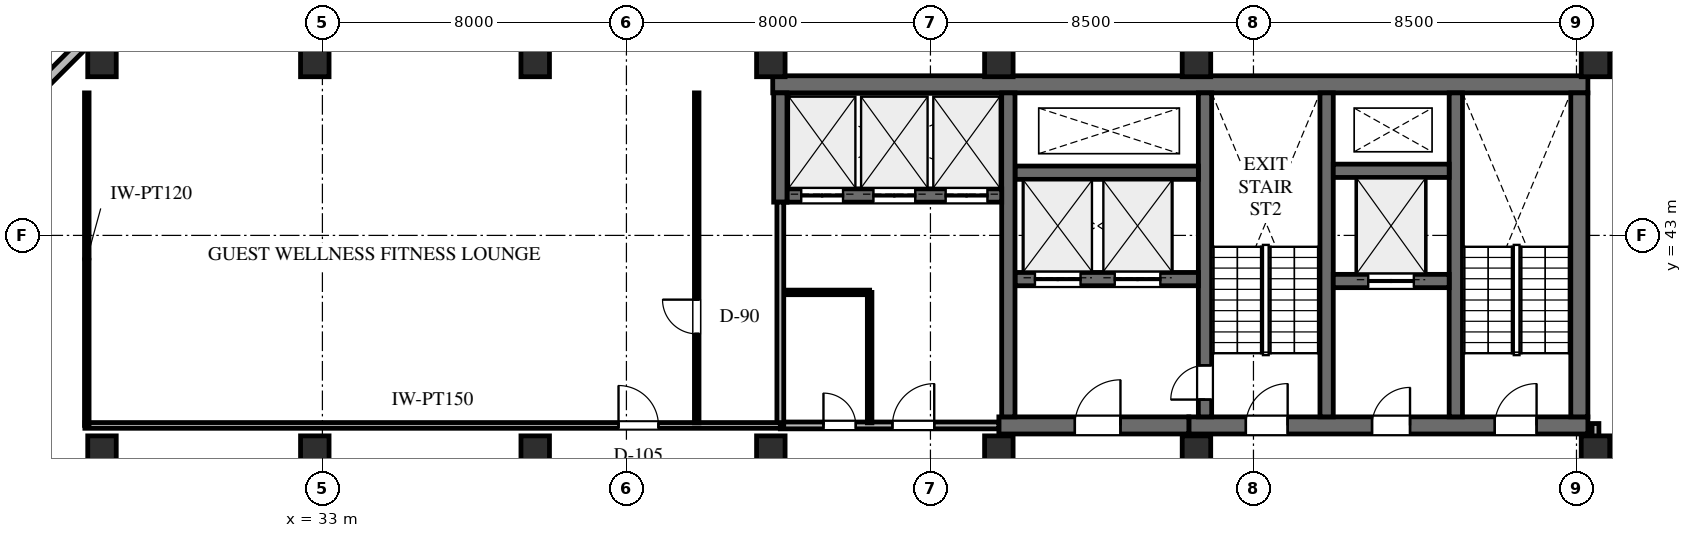
"""IFC4 building model, lengths in metres.
Left out: names, types, materials, properties, quantities, classifications, styles, units other than length and angle.
Written with IfcOpenShell. Run it as: python <this file> out.ifc"""

import sys

from ifc_helpers import new_model, si_unit, direction, frame, frame_2d, origin, origin_2d, place, context, subcontext, project, spatial, rectangle, extrude, element, fill, save


model = new_model("IFC4")
c1 = context("Model", 3, precision=1e-05, world=origin(), true_north=direction((0.0, 1.0)))
c2 = subcontext(c1, "Body", "Model", "MODEL_VIEW")
j1 = project(units=[si_unit("LENGTHUNIT", "METRE"), si_unit("PLANEANGLEUNIT", "RADIAN")], contexts=[c1])
p1 = place(None, origin())
s1 = spatial("IfcSite", under=j1, at=p1, CompositionType="ELEMENT")
p2 = place(p1, origin())
s2 = spatial("IfcBuilding", under=s1, at=p2, CompositionType="ELEMENT")
p3 = place(p2, frame((0.0, 0.0, 249.0)))
s3 = spatial("IfcBuildingStorey", under=s2, at=p3, CompositionType="ELEMENT", Elevation=249.0)
p4 = place(p3, frame((44.85, 46.975, 0.0), z_axis=(0.0, 0.0, 1.0), x_axis=(1.0, 0.0, 0.0)))
e1 = element("IfcWall", 1, at=p4, inside=s3, PredefinedType="SHEAR", context=c2, shape_type="SweptSolid", body=[
    extrude(rectangle(XDim=21.45, YDim=0.45, at=frame_2d((10.725, 0.0))), origin(), (0.0, 0.0, 1.0), 3.6),
])
p5 = place(p3, frame((55.8, 38.0, 0.0), z_axis=(0.0, 0.0, 1.0), x_axis=(1.0, 0.0, 0.0)))
e2 = element("IfcWall", 2, at=p5, inside=s3, PredefinedType="SHEAR", context=c2, shape_type="SweptSolid", body=[
    extrude(rectangle(XDim=10.5, YDim=0.45, at=frame_2d((5.25, 0.0))), origin(), (0.0, 0.0, 1.0), 3.6),
])
p6 = place(p5, frame((1.5, 0.0, 0.0)))
e3 = element("IfcOpeningElement", 3, at=p6, cuts=e2, PredefinedType="OPENING", context=c2, shape_type="SweptSolid", body=[
    extrude(rectangle(XDim=1.1, YDim=2.2, at=frame_2d((0.55, 1.1))), frame((0.0, 0.235, 0.0), z_axis=(0.0, -1.0, 0.0), x_axis=(1.0, 0.0, 0.0)), (0.0, 0.0, 1.0), 0.47),
])
p7 = place(p5, frame((4.82, 0.0, 0.0)))
e4 = element("IfcOpeningElement", 4, at=p7, cuts=e2, PredefinedType="OPENING", context=c2, shape_type="SweptSolid", body=[
    extrude(rectangle(XDim=1.0, YDim=2.15, at=frame_2d((0.5, 1.075))), frame((0.0, 0.235, 0.0), z_axis=(0.0, -1.0, 0.0), x_axis=(1.0, 0.0, 0.0)), (0.0, 0.0, 1.0), 0.47),
])
p8 = place(p5, frame((8.05, 0.0, 0.0)))
e5 = element("IfcOpeningElement", 5, at=p8, cuts=e2, PredefinedType="OPENING", context=c2, shape_type="SweptSolid", body=[
    extrude(rectangle(XDim=1.1, YDim=2.2, at=frame_2d((0.55, 1.1))), frame((0.0, 0.235, 0.0), z_axis=(0.0, -1.0, 0.0), x_axis=(1.0, 0.0, 0.0)), (0.0, 0.0, 1.0), 0.47),
])
p9 = place(p3, frame((66.075, 38.225, 0.0), z_axis=(0.0, 0.0, 1.0), x_axis=(0.0, 1.0, 0.0)))
e6 = element("IfcWall", 6, at=p9, inside=s3, PredefinedType="SHEAR", context=c2, shape_type="SweptSolid", body=[
    extrude(rectangle(XDim=8.525, YDim=0.45, at=frame_2d((4.262, 0.0))), origin(), (0.0, 0.0, 1.0), 3.6),
])
for number, where, z_axis, x_axis in (
    (7, (62.825, 38.225, 0.0), (0.0, 0.0, 1.0), (0.0, 1.0, 0.0)),
    (8, (59.425, 38.225, 0.0), (0.0, 0.0, 1.0), (0.0, 1.0, 0.0)),
):
    element("IfcWall", number, at=place(p3, frame(where, z_axis=z_axis, x_axis=x_axis)), inside=s3, PredefinedType="SHEAR", context=c2, shape_type="SweptSolid", body=[
        extrude(rectangle(XDim=8.525, YDim=0.35, at=frame_2d((4.262, 0.0))), origin(), (0.0, 0.0, 1.0), 3.6),
    ])
p10 = place(p3, frame((56.225, 38.225, 0.0), z_axis=(0.0, 0.0, 1.0), x_axis=(0.0, 1.0, 0.0)))
e9 = element("IfcWall", 9, at=p10, inside=s3, PredefinedType="SHEAR", context=c2, shape_type="SweptSolid", body=[
    extrude(rectangle(XDim=8.525, YDim=0.35, at=frame_2d((4.262, 0.0))), origin(), (0.0, 0.0, 1.0), 3.6),
])
p11 = place(p10, frame((0.455, 0.0, 0.0)))
e10 = element("IfcOpeningElement", 10, at=p11, cuts=e9, PredefinedType="OPENING", context=c2, shape_type="SweptSolid", body=[
    extrude(rectangle(XDim=0.9, YDim=2.15, at=frame_2d((0.45, 1.075))), frame((0.0, 0.185, 0.0), z_axis=(0.0, -1.0, 0.0), x_axis=(1.0, 0.0, 0.0)), (0.0, 0.0, 1.0), 0.37),
])
p12 = place(p3, frame((59.6, 41.8, 0.0), z_axis=(0.0, 0.0, 1.0), x_axis=(1.0, 0.0, 0.0)))
e11 = element("IfcWall", 11, at=p12, inside=s3, PredefinedType="SHEAR", context=c2, shape_type="SweptSolid", body=[
    extrude(rectangle(XDim=3.05, YDim=0.35, at=frame_2d((1.525, 0.0))), origin(), (0.0, 0.0, 1.0), 3.6),
])
p13 = place(p12, frame((0.92, 0.0, 0.0)))
e12 = element("IfcOpeningElement", 12, at=p13, cuts=e11, PredefinedType="OPENING", context=c2, shape_type="SweptSolid", body=[
    extrude(rectangle(XDim=1.2, YDim=2.2, at=frame_2d((0.6, 1.1))), frame((0.0, 0.185, 0.0), z_axis=(0.0, -1.0, 0.0), x_axis=(1.0, 0.0, 0.0)), (0.0, 0.0, 1.0), 0.37),
])
p14 = place(p3, frame((59.6, 44.7, 0.0), z_axis=(0.0, 0.0, 1.0), x_axis=(1.0, 0.0, 0.0)))
e13 = element("IfcWall", 13, at=p14, inside=s3, PredefinedType="SHEAR", context=c2, shape_type="SweptSolid", body=[
    extrude(rectangle(XDim=3.05, YDim=0.35, at=frame_2d((1.525, 0.0))), origin(), (0.0, 0.0, 1.0), 3.6),
])
p15 = place(p3, frame((50.8, 38.0, 0.0), z_axis=(0.0, 0.0, 1.0), x_axis=(1.0, 0.0, 0.0)))
e14 = element("IfcWall", 14, at=p15, inside=s3, PredefinedType="SHEAR", context=c2, shape_type="SweptSolid", body=[
    extrude(rectangle(XDim=5.0, YDim=0.45, at=frame_2d((2.5, 0.0))), origin(), (0.0, 0.0, 1.0), 3.6),
])
p16 = place(p15, frame((2.0, 0.0, 0.0)))
e15 = element("IfcOpeningElement", 15, at=p16, cuts=e14, PredefinedType="OPENING", context=c2, shape_type="SweptSolid", body=[
    extrude(rectangle(XDim=1.2, YDim=2.2, at=frame_2d((0.6, 1.1))), frame((0.0, 0.235, 0.0), z_axis=(0.0, -1.0, 0.0), x_axis=(1.0, 0.0, 0.0)), (0.0, 0.0, 1.0), 0.47),
])
p17 = place(p3, frame((51.225, 41.85, 0.0), z_axis=(0.0, 0.0, 1.0), x_axis=(1.0, 0.0, 0.0)))
e16 = element("IfcWall", 16, at=p17, inside=s3, PredefinedType="SHEAR", context=c2, shape_type="SweptSolid", body=[
    extrude(rectangle(XDim=4.825, YDim=0.35, at=frame_2d((2.413, 0.0))), origin(), (0.0, 0.0, 1.0), 3.6),
])
p18 = place(p17, frame((0.525, 0.0, 0.0)))
e17 = element("IfcOpeningElement", 17, at=p18, cuts=e16, PredefinedType="OPENING", context=c2, shape_type="SweptSolid", body=[
    extrude(rectangle(XDim=1.2, YDim=2.2, at=frame_2d((0.6, 1.1))), frame((0.0, 0.185, 0.0), z_axis=(0.0, -1.0, 0.0), x_axis=(1.0, 0.0, 0.0)), (0.0, 0.0, 1.0), 0.37),
])
p19 = place(p17, frame((2.625, 0.0, 0.0)))
e18 = element("IfcOpeningElement", 18, at=p19, cuts=e16, PredefinedType="OPENING", context=c2, shape_type="SweptSolid", body=[
    extrude(rectangle(XDim=1.2, YDim=2.2, at=frame_2d((0.6, 1.1))), frame((0.0, 0.185, 0.0), z_axis=(0.0, -1.0, 0.0), x_axis=(1.0, 0.0, 0.0)), (0.0, 0.0, 1.0), 0.37),
])
p20 = place(p3, frame((51.225, 44.65, 0.0), z_axis=(0.0, 0.0, 1.0), x_axis=(1.0, 0.0, 0.0)))
e19 = element("IfcWall", 19, at=p20, inside=s3, PredefinedType="SHEAR", context=c2, shape_type="SweptSolid", body=[
    extrude(rectangle(XDim=4.825, YDim=0.35, at=frame_2d((2.413, 0.0))), origin(), (0.0, 0.0, 1.0), 3.6),
])
p21 = place(p3, frame((51.05, 38.225, 0.0), z_axis=(0.0, 0.0, 1.0), x_axis=(0.0, 1.0, 0.0)))
e20 = element("IfcWall", 20, at=p21, inside=s3, PredefinedType="SHEAR", context=c2, shape_type="SweptSolid", body=[
    extrude(rectangle(XDim=8.525, YDim=0.35, at=frame_2d((4.262, 0.0))), origin(), (0.0, 0.0, 1.0), 3.6),
])
p22 = place(p3, frame((45.225, 44.05, 0.0), z_axis=(0.0, 0.0, 1.0), x_axis=(1.0, 0.0, 0.0)))
e21 = element("IfcWall", 21, at=p22, inside=s3, PredefinedType="SHEAR", context=c2, shape_type="SweptSolid", body=[
    extrude(rectangle(XDim=5.65, YDim=0.35, at=frame_2d((2.825, 0.0))), origin(), (0.0, 0.0, 1.0), 3.6),
])
p23 = place(p22, frame((0.375, 0.0, 0.0)))
e22 = element("IfcOpeningElement", 22, at=p23, cuts=e21, PredefinedType="OPENING", context=c2, shape_type="SweptSolid", body=[
    extrude(rectangle(XDim=1.1, YDim=2.2, at=frame_2d((0.55, 1.1))), frame((0.0, 0.185, 0.0), z_axis=(0.0, -1.0, 0.0), x_axis=(1.0, 0.0, 0.0)), (0.0, 0.0, 1.0), 0.37),
])
p24 = place(p22, frame((2.275, 0.0, 0.0)))
e23 = element("IfcOpeningElement", 23, at=p24, cuts=e21, PredefinedType="OPENING", context=c2, shape_type="SweptSolid", body=[
    extrude(rectangle(XDim=1.1, YDim=2.2, at=frame_2d((0.55, 1.1))), frame((0.0, 0.185, 0.0), z_axis=(0.0, -1.0, 0.0), x_axis=(1.0, 0.0, 0.0)), (0.0, 0.0, 1.0), 0.37),
])
p25 = place(p22, frame((4.175, 0.0, 0.0)))
e24 = element("IfcOpeningElement", 24, at=p25, cuts=e21, PredefinedType="OPENING", context=c2, shape_type="SweptSolid", body=[
    extrude(rectangle(XDim=1.1, YDim=2.2, at=frame_2d((0.55, 1.1))), frame((0.0, 0.185, 0.0), z_axis=(0.0, -1.0, 0.0), x_axis=(1.0, 0.0, 0.0)), (0.0, 0.0, 1.0), 0.37),
])
p26 = place(p3, frame((45.05, 43.875, 0.0), z_axis=(0.0, 0.0, 1.0), x_axis=(0.0, 1.0, 0.0)))
e25 = element("IfcWall", 25, at=p26, inside=s3, PredefinedType="SHEAR", context=c2, shape_type="SweptSolid", body=[
    extrude(rectangle(XDim=2.875, YDim=0.35, at=frame_2d((1.438, 0.0))), origin(), (0.0, 0.0, 1.0), 3.6),
])
for number, where, z_axis, x_axis in (
    (26, (66.5, 47.55, 0.0), (0.0, 0.0, 1.0), (1.0, 0.0, 0.0)),
    (27, (56.0, 47.55, 0.0), (0.0, 0.0, 1.0), (1.0, 0.0, 0.0)),
    (28, (66.5, 37.35, 0.0), (0.0, 0.0, 1.0), (1.0, 0.0, 0.0)),
    (29, (56.0, 37.35, 0.0), (0.0, 0.0, 1.0), (1.0, 0.0, 0.0)),
    (30, (50.8, 47.55, 0.0), (0.0, 0.0, 1.0), (1.0, 0.0, 0.0)),
    (31, (50.8, 37.35, 0.0), (0.0, 0.0, 1.0), (1.0, 0.0, 0.0)),
    (32, (44.8, 37.35, 0.0), (0.0, 0.0, 1.0), (1.0, 0.0, 0.0)),
    (33, (44.8, 47.55, 0.0), (0.0, 0.0, 1.0), (1.0, 0.0, 0.0)),
    (34, (38.6, 37.35, 0.0), (0.0, 0.0, 1.0), (1.0, 0.0, 0.0)),
    (35, (38.6, 47.55, 0.0), (0.0, 0.0, 1.0), (1.0, 0.0, 0.0)),
    (36, (32.8, 37.35, 0.0), (0.0, 0.0, 1.0), (1.0, 0.0, 0.0)),
    (37, (32.8, 47.55, 0.0), (0.0, 0.0, 1.0), (1.0, 0.0, 0.0)),
    (38, (27.2, 37.35, 0.0), (0.0, 0.0, 1.0), (1.0, 0.0, 0.0)),
    (39, (27.2, 47.55, 0.0), (0.0, 0.0, 1.0), (1.0, 0.0, 0.0)),
):
    element("IfcColumn", number, at=place(p3, frame(where, z_axis=z_axis, x_axis=x_axis)), inside=s3, PredefinedType="COLUMN", context=c2, shape_type="SweptSolid", body=[
        extrude(rectangle(XDim=0.75, YDim=0.75, at=origin_2d()), origin(), (0.0, 0.0, 1.0), 3.6),
    ])
p27 = place(p3, frame((25.12, 46.45, 0.0), z_axis=(0.0, 0.0, 1.0), x_axis=(0.707106781187, 0.707106781187, 0.0)))
e40 = element("IfcWall", 40, at=p27, inside=s3, PredefinedType="STANDARD", context=c2, shape_type="SweptSolid", body=[
    extrude(rectangle(XDim=2.729, YDim=0.28, at=frame_2d((1.365, 0.0))), origin(), (0.0, 0.0, 1.0), 3.36),
])
p28 = place(p3, frame((68.375, 37.8, 0.0), z_axis=(0.0, 0.0, 1.0), x_axis=(-0.13917438523, -0.990267888248, 0.0)))
e41 = element("IfcWall", 41, at=p28, inside=s3, PredefinedType="STANDARD", context=c2, shape_type="SweptSolid", body=[
    extrude(rectangle(XDim=18.135, YDim=0.28, at=frame_2d((9.067, 0.0))), origin(), (0.0, 0.0, 1.0), 3.36),
])
p29 = place(p28, frame((8.279, 0.0, 0.0)))
e42 = element("IfcOpeningElement", 42, at=p29, cuts=e41, PredefinedType="OPENING", context=c2, shape_type="SweptSolid", body=[
    extrude(rectangle(XDim=1.0, YDim=2.15, at=frame_2d((0.5, 1.075))), frame((0.0, 0.15, 0.0), z_axis=(0.0, -1.0, 0.0), x_axis=(1.0, 0.0, 0.0)), (0.0, 0.0, 1.0), 0.3),
])
p30 = place(p28, frame((3.997, 0.0, 0.65)))
e43 = element("IfcOpeningElement", 43, at=p30, cuts=e41, PredefinedType="OPENING", context=c2, shape_type="SweptSolid", body=[
    extrude(rectangle(XDim=1.8, YDim=2.1, at=frame_2d((0.9, 1.05))), frame((0.0, 0.15, 0.0), z_axis=(0.0, -1.0, 0.0), x_axis=(1.0, 0.0, 0.0)), (0.0, 0.0, 1.0), 0.3),
])
p31 = place(p28, frame((12.338, 0.0, 0.65)))
e44 = element("IfcOpeningElement", 44, at=p31, cuts=e41, PredefinedType="OPENING", context=c2, shape_type="SweptSolid", body=[
    extrude(rectangle(XDim=1.8, YDim=2.1, at=frame_2d((0.9, 1.05))), frame((0.0, 0.15, 0.0), z_axis=(0.0, -1.0, 0.0), x_axis=(1.0, 0.0, 0.0)), (0.0, 0.0, 1.0), 0.3),
])
p32 = place(p3, frame((45.05, 38.0, 0.0), z_axis=(0.0, 0.0, 1.0), x_axis=(1.0, 0.0, 0.0)))
e45 = element("IfcWall", 45, at=p32, inside=s3, PredefinedType="STANDARD", context=c2, shape_type="SweptSolid", body=[
    extrude(rectangle(XDim=5.75, YDim=0.18, at=frame_2d((2.875, 0.0))), origin(), (0.0, 0.0, 1.0), 2.664),
])
p33 = place(p32, frame((1.135, 0.0, 0.0)))
e46 = element("IfcOpeningElement", 46, at=p33, cuts=e45, PredefinedType="OPENING", context=c2, shape_type="SweptSolid", body=[
    extrude(rectangle(XDim=0.85, YDim=2.1, at=frame_2d((0.425, 1.05))), frame((0.0, 0.1, 0.0), z_axis=(0.0, -1.0, 0.0), x_axis=(1.0, 0.0, 0.0)), (0.0, 0.0, 1.0), 0.2),
])
p34 = place(p32, frame((2.95, 0.0, 0.0)))
e47 = element("IfcOpeningElement", 47, at=p34, cuts=e45, PredefinedType="OPENING", context=c2, shape_type="SweptSolid", body=[
    extrude(rectangle(XDim=1.1, YDim=2.2, at=frame_2d((0.55, 1.1))), frame((0.0, 0.1, 0.0), z_axis=(0.0, -1.0, 0.0), x_axis=(1.0, 0.0, 0.0)), (0.0, 0.0, 1.0), 0.2),
])
p35 = place(p3, frame((47.4, 38.068, 0.0), z_axis=(0.0, 0.0, 1.0), x_axis=(0.0, 1.0, 0.0)))
e48 = element("IfcWall", 48, at=p35, inside=s3, PredefinedType="PARTITIONING", context=c2, shape_type="SweptSolid", body=[
    extrude(rectangle(XDim=3.432, YDim=0.12, at=frame_2d((1.716, 0.0))), origin(), (0.0, 0.0, 1.0), 3.36),
])
p36 = place(p3, frame((45.118, 41.5, 0.0), z_axis=(0.0, 0.0, 1.0), x_axis=(1.0, 0.0, 0.0)))
e49 = element("IfcWall", 49, at=p36, inside=s3, PredefinedType="PARTITIONING", context=c2, shape_type="SweptSolid", body=[
    extrude(rectangle(XDim=2.282, YDim=0.12, at=frame_2d((1.141, 0.0))), origin(), (0.0, 0.0, 1.0), 3.36),
])
p37 = place(p3, frame((45.05, 38.0, 0.0), z_axis=(0.0, 0.0, 1.0), x_axis=(0.0, 1.0, 0.0)))
e50 = element("IfcWall", 50, at=p37, inside=s3, PredefinedType="STANDARD", context=c2, shape_type="SweptSolid", body=[
    extrude(rectangle(XDim=5.875, YDim=0.18, at=frame_2d((2.938, 0.0))), origin(), (0.0, 0.0, 1.0), 2.664),
])
p38 = place(p3, frame((26.75, 38.0, 0.0), z_axis=(0.0, 0.0, 1.0), x_axis=(1.0, 0.0, 0.0)))
e51 = element("IfcWall", 51, at=p38, inside=s3, PredefinedType="PARTITIONING", context=c2, shape_type="SweptSolid", body=[
    extrude(rectangle(XDim=18.3, YDim=0.15, at=frame_2d((9.15, 0.0))), origin(), (0.0, 0.0, 1.0), 2.664),
])
p39 = place(p38, frame((14.042, 0.0, 0.0)))
e52 = element("IfcOpeningElement", 52, at=p39, cuts=e51, PredefinedType="OPENING", context=c2, shape_type="SweptSolid", body=[
    extrude(rectangle(XDim=1.05, YDim=2.2, at=frame_2d((0.525, 1.1))), frame((0.0, 0.085, 0.0), z_axis=(0.0, -1.0, 0.0), x_axis=(1.0, 0.0, 0.0)), (0.0, 0.0, 1.0), 0.17),
])
p40 = place(p3, frame((26.8, 38.0, 0.0), z_axis=(0.0, 0.0, 1.0), x_axis=(0.0, 1.0, 0.0)))
e53 = element("IfcWall", 53, at=p40, inside=s3, PredefinedType="PARTITIONING", context=c2, shape_type="SweptSolid", body=[
    extrude(rectangle(XDim=8.75, YDim=0.12, at=frame_2d((4.375, 0.0))), origin(), (0.0, 0.0, 1.0), 3.36),
])
p41 = place(p3, frame((42.85, 38.068, 0.0), z_axis=(0.0, 0.0, 1.0), x_axis=(0.0, 1.0, 0.0)))
e54 = element("IfcWall", 54, at=p41, inside=s3, PredefinedType="PARTITIONING", context=c2, shape_type="SweptSolid", body=[
    extrude(rectangle(XDim=8.682, YDim=0.12, at=frame_2d((4.341, 0.0))), origin(), (0.0, 0.0, 1.0), 3.36),
])
p42 = place(p41, frame((2.342, 0.0, 0.0)))
e55 = element("IfcOpeningElement", 55, at=p42, cuts=e54, PredefinedType="OPENING", context=c2, shape_type="SweptSolid", body=[
    extrude(rectangle(XDim=0.9, YDim=2.1, at=frame_2d((0.45, 1.05))), frame((0.0, 0.07, 0.0), z_axis=(0.0, -1.0, 0.0), x_axis=(1.0, 0.0, 0.0)), (0.0, 0.0, 1.0), 0.14),
])
p43 = place(p3, frame((66.5, 34.468, 0.0), z_axis=(0.0, 0.0, 1.0), x_axis=(0.0, 1.0, 0.0)))
e56 = element("IfcWall", 56, at=p43, inside=s3, PredefinedType="STANDARD", context=c2, shape_type="SweptSolid", body=[
    extrude(rectangle(XDim=3.582, YDim=0.18, at=frame_2d((1.791, 0.0))), origin(), (0.0, 0.0, 1.0), 2.664),
])
p44 = place(p6, origin())
e57 = element("IfcDoor", 57, at=p44, inside=s3, OperationType="SINGLE_SWING_RIGHT", PredefinedType="DOOR", context=c2, shape_type="SweptSolid", body=[
    extrude(rectangle(XDim=1.1, YDim=2.2, at=frame_2d((0.55, 1.1))), frame((0.0, 0.025, 0.0), z_axis=(0.0, -1.0, 0.0), x_axis=(1.0, 0.0, 0.0)), (0.0, 0.0, 1.0), 0.05),
])
fill(e3, e57)
p45 = place(p7, origin())
e58 = element("IfcDoor", 58, at=p45, inside=s3, OperationType="SINGLE_SWING_RIGHT", PredefinedType="DOOR", context=c2, shape_type="SweptSolid", body=[
    extrude(rectangle(XDim=1.0, YDim=2.15, at=frame_2d((0.5, 1.075))), frame((0.0, 0.025, 0.0), z_axis=(0.0, -1.0, 0.0), x_axis=(1.0, 0.0, 0.0)), (0.0, 0.0, 1.0), 0.05),
])
fill(e4, e58)
p46 = place(p8, origin())
e59 = element("IfcDoor", 59, at=p46, inside=s3, OperationType="SINGLE_SWING_RIGHT", PredefinedType="DOOR", context=c2, shape_type="SweptSolid", body=[
    extrude(rectangle(XDim=1.1, YDim=2.2, at=frame_2d((0.55, 1.1))), frame((0.0, 0.025, 0.0), z_axis=(0.0, -1.0, 0.0), x_axis=(1.0, 0.0, 0.0)), (0.0, 0.0, 1.0), 0.05),
])
fill(e5, e59)
p47 = place(p16, origin())
e60 = element("IfcDoor", 60, at=p47, inside=s3, OperationType="SINGLE_SWING_RIGHT", PredefinedType="DOOR", context=c2, shape_type="SweptSolid", body=[
    extrude(rectangle(XDim=1.2, YDim=2.2, at=frame_2d((0.6, 1.1))), frame((0.0, 0.025, 0.0), z_axis=(0.0, -1.0, 0.0), x_axis=(1.0, 0.0, 0.0)), (0.0, 0.0, 1.0), 0.05),
])
fill(e15, e60)
p48 = place(p11, origin())
e61 = element("IfcDoor", 61, at=p48, inside=s3, OperationType="SINGLE_SWING_LEFT", PredefinedType="DOOR", context=c2, shape_type="SweptSolid", body=[
    extrude(rectangle(XDim=0.9, YDim=2.15, at=frame_2d((0.45, 1.075))), frame((0.0, 0.025, 0.0), z_axis=(0.0, -1.0, 0.0), x_axis=(1.0, 0.0, 0.0)), (0.0, 0.0, 1.0), 0.05),
])
fill(e10, e61)
p49 = place(p23, origin())
e62 = element("IfcDoor", 62, at=p49, inside=s3, OperationType="DOUBLE_DOOR_SLIDING", PredefinedType="DOOR", context=c2, shape_type="SweptSolid", body=[
    extrude(rectangle(XDim=1.1, YDim=2.2, at=frame_2d((0.55, 1.1))), frame((0.0, 0.025, 0.0), z_axis=(0.0, -1.0, 0.0), x_axis=(1.0, 0.0, 0.0)), (0.0, 0.0, 1.0), 0.05),
])
fill(e22, e62)
p50 = place(p24, origin())
e63 = element("IfcDoor", 63, at=p50, inside=s3, OperationType="DOUBLE_DOOR_SLIDING", PredefinedType="DOOR", context=c2, shape_type="SweptSolid", body=[
    extrude(rectangle(XDim=1.1, YDim=2.2, at=frame_2d((0.55, 1.1))), frame((0.0, 0.025, 0.0), z_axis=(0.0, -1.0, 0.0), x_axis=(1.0, 0.0, 0.0)), (0.0, 0.0, 1.0), 0.05),
])
fill(e23, e63)
p51 = place(p25, origin())
e64 = element("IfcDoor", 64, at=p51, inside=s3, OperationType="DOUBLE_DOOR_SLIDING", PredefinedType="DOOR", context=c2, shape_type="SweptSolid", body=[
    extrude(rectangle(XDim=1.1, YDim=2.2, at=frame_2d((0.55, 1.1))), frame((0.0, 0.025, 0.0), z_axis=(0.0, -1.0, 0.0), x_axis=(1.0, 0.0, 0.0)), (0.0, 0.0, 1.0), 0.05),
])
fill(e24, e64)
p52 = place(p18, origin())
e65 = element("IfcDoor", 65, at=p52, inside=s3, OperationType="DOUBLE_DOOR_SLIDING", PredefinedType="DOOR", context=c2, shape_type="SweptSolid", body=[
    extrude(rectangle(XDim=1.2, YDim=2.2, at=frame_2d((0.6, 1.1))), frame((0.0, 0.025, 0.0), z_axis=(0.0, -1.0, 0.0), x_axis=(1.0, 0.0, 0.0)), (0.0, 0.0, 1.0), 0.05),
])
fill(e17, e65)
p53 = place(p19, origin())
e66 = element("IfcDoor", 66, at=p53, inside=s3, OperationType="DOUBLE_DOOR_SLIDING", PredefinedType="DOOR", context=c2, shape_type="SweptSolid", body=[
    extrude(rectangle(XDim=1.2, YDim=2.2, at=frame_2d((0.6, 1.1))), frame((0.0, 0.025, 0.0), z_axis=(0.0, -1.0, 0.0), x_axis=(1.0, 0.0, 0.0)), (0.0, 0.0, 1.0), 0.05),
])
fill(e18, e66)
p54 = place(p13, origin())
e67 = element("IfcDoor", 67, at=p54, inside=s3, OperationType="DOUBLE_DOOR_SLIDING", PredefinedType="DOOR", context=c2, shape_type="SweptSolid", body=[
    extrude(rectangle(XDim=1.2, YDim=2.2, at=frame_2d((0.6, 1.1))), frame((0.0, 0.025, 0.0), z_axis=(0.0, -1.0, 0.0), x_axis=(1.0, 0.0, 0.0)), (0.0, 0.0, 1.0), 0.05),
])
fill(e12, e67)
p55 = place(p33, origin())
e68 = element("IfcDoor", 68, at=p55, inside=s3, OperationType="SINGLE_SWING_LEFT", PredefinedType="DOOR", context=c2, shape_type="SweptSolid", body=[
    extrude(rectangle(XDim=0.85, YDim=2.1, at=frame_2d((0.425, 1.05))), frame((0.0, 0.025, 0.0), z_axis=(0.0, -1.0, 0.0), x_axis=(1.0, 0.0, 0.0)), (0.0, 0.0, 1.0), 0.05),
])
fill(e46, e68)
p56 = place(p34, origin())
e69 = element("IfcDoor", 69, at=p56, inside=s3, OperationType="SINGLE_SWING_RIGHT", PredefinedType="DOOR", context=c2, shape_type="SweptSolid", body=[
    extrude(rectangle(XDim=1.1, YDim=2.2, at=frame_2d((0.55, 1.1))), frame((0.0, 0.025, 0.0), z_axis=(0.0, -1.0, 0.0), x_axis=(1.0, 0.0, 0.0)), (0.0, 0.0, 1.0), 0.05),
])
fill(e47, e69)
p57 = place(p39, origin())
e70 = element("IfcDoor", 70, at=p57, inside=s3, OperationType="SINGLE_SWING_LEFT", PredefinedType="DOOR", context=c2, shape_type="SweptSolid", body=[
    extrude(rectangle(XDim=1.05, YDim=2.2, at=frame_2d((0.525, 1.1))), frame((0.0, 0.025, 0.0), z_axis=(0.0, -1.0, 0.0), x_axis=(1.0, 0.0, 0.0)), (0.0, 0.0, 1.0), 0.05),
])
fill(e52, e70)
p58 = place(p42, origin())
e71 = element("IfcDoor", 71, at=p58, inside=s3, OperationType="SINGLE_SWING_RIGHT", PredefinedType="DOOR", context=c2, shape_type="SweptSolid", body=[
    extrude(rectangle(XDim=0.9, YDim=2.1, at=frame_2d((0.45, 1.05))), frame((0.0, 0.025, 0.0), z_axis=(0.0, -1.0, 0.0), x_axis=(1.0, 0.0, 0.0)), (0.0, 0.0, 1.0), 0.05),
])
fill(e55, e71)
save(model, sys.argv[1])
